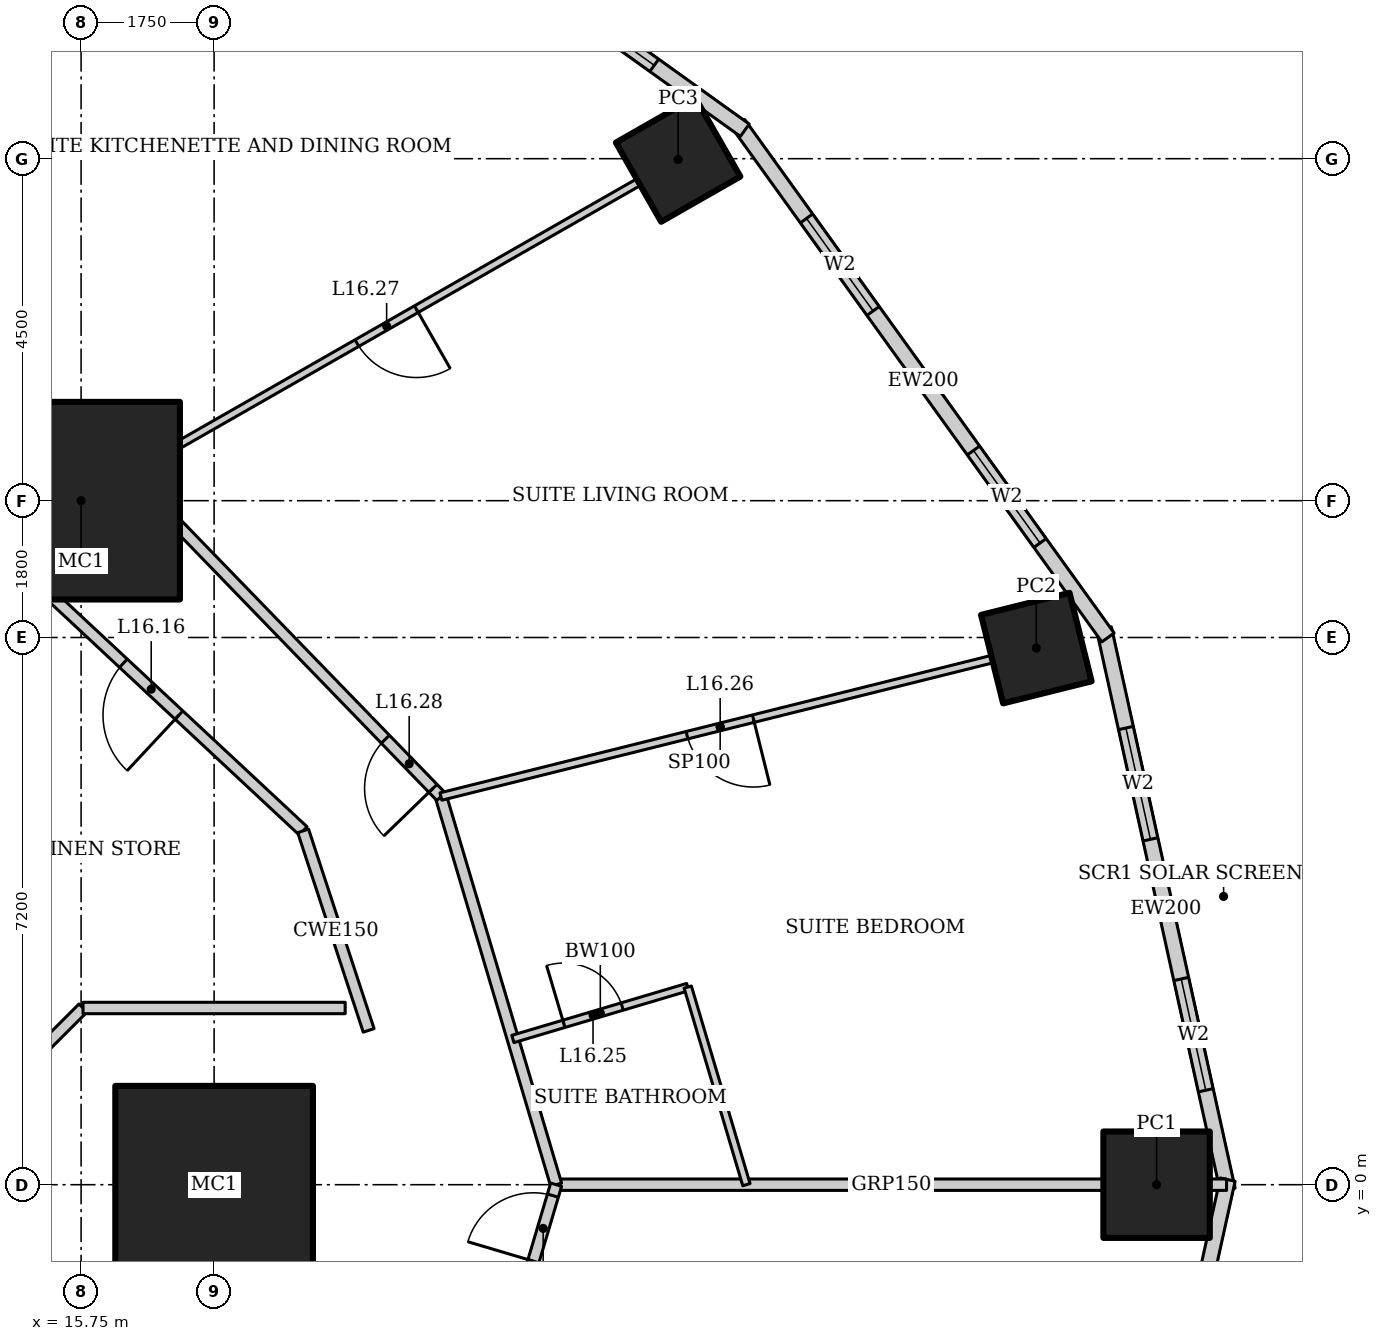
"""IFC4 building model, lengths in metres.
Left out: names, types, materials, properties, quantities, classifications, styles, units other than length and angle.
Written with IfcOpenShell. Run it as: python <this file> out.ifc"""

import sys

from ifc_helpers import new_model, si_unit, direction, frame, frame_2d, origin, origin_2d, place, context, subcontext, project, spatial, rectangle, hollow_rectangle, extrude, element, fill, save


model = new_model("IFC4")
c1 = context("Model", 3, precision=1e-05, world=origin(), true_north=direction((0.0, 1.0)))
c2 = subcontext(c1, "Body", "Model", "MODEL_VIEW")
j1 = project(units=[si_unit("LENGTHUNIT", "METRE"), si_unit("PLANEANGLEUNIT", "RADIAN")], contexts=[c1])
p1 = place(None, origin())
s1 = spatial("IfcSite", under=j1, at=p1, CompositionType="ELEMENT")
p2 = place(p1, origin())
s2 = spatial("IfcBuilding", under=s1, at=p2, CompositionType="ELEMENT")
p3 = place(p2, frame((0.0, 0.0, 73.0)))
s3 = spatial("IfcBuildingStorey", under=s2, at=p3, CompositionType="ELEMENT", Elevation=73.0)
for number, where, z_axis, x_axis in (
    (1, (17.5, 0.0, 0.0), (0.0, 0.0, 1.0), (1.0, 0.0, 0.0)),
    (2, (15.75, 9.0, 0.0), (0.0, 0.0, 1.0), (1.0, 0.0, 0.0)),
):
    element("IfcColumn", number, at=place(p3, frame(where, z_axis=z_axis, x_axis=x_axis)), inside=s3, PredefinedType="COLUMN", context=c2, shape_type="SweptSolid", body=[
        extrude(hollow_rectangle(XDim=2.6, YDim=2.6, WallThickness=0.13, at=origin_2d()), origin(), (0.0, 0.0, 1.0), 3.6),
    ])
p4 = place(p3, frame((29.9, 0.0, 0.0), z_axis=(0.0, 0.0, 1.0), x_axis=(1.0, 0.0, 0.0)))
e3 = element("IfcColumn", 3, at=p4, inside=s3, PredefinedType="COLUMN", context=c2, shape_type="SweptSolid", body=[
    extrude(hollow_rectangle(XDim=1.4, YDim=1.4, WallThickness=0.1, at=origin_2d()), origin(), (0.0, 0.0, 1.0), 3.6),
])
p5 = place(p3, frame((28.318, 7.06, 0.0), z_axis=(0.0, 0.0, 1.0), x_axis=(0.970295726276, 0.2419218956, 0.0)))
e4 = element("IfcColumn", 4, at=p5, inside=s3, PredefinedType="COLUMN", context=c2, shape_type="SweptSolid", body=[
    extrude(hollow_rectangle(XDim=1.2, YDim=1.2, WallThickness=0.1, at=origin_2d()), origin(), (0.0, 0.0, 1.0), 3.6),
])
p6 = place(p3, frame((23.605, 13.489, 0.0), z_axis=(0.0, 0.0, 1.0), x_axis=(0.86824298017, 0.496139221777, 0.0)))
e5 = element("IfcColumn", 5, at=p6, inside=s3, PredefinedType="COLUMN", context=c2, shape_type="SweptSolid", body=[
    extrude(hollow_rectangle(XDim=1.2, YDim=1.2, WallThickness=0.12, at=origin_2d()), origin(), (0.0, 0.0, 1.0), 3.6),
])
p7 = place(p3, frame((30.835, -0.067, 0.0), z_axis=(0.0, 0.0, 1.0), x_axis=(-0.215238065514, 0.976561608478, 0.0)))
e6 = element("IfcWall", 6, at=p7, inside=s3, PredefinedType="SOLIDWALL", context=c2, shape_type="SweptSolid", body=[
    extrude(rectangle(XDim=7.562, YDim=0.2, at=frame_2d((3.781, 0.0))), origin(), (0.0, 0.0, 1.0), 3.45),
])
p8 = place(p7, frame((1.341, 0.0, 0.5)))
e7 = element("IfcOpeningElement", 7, at=p8, cuts=e6, PredefinedType="OPENING", context=c2, shape_type="SweptSolid", body=[
    extrude(rectangle(XDim=1.5, YDim=2.2, at=frame_2d((0.75, 1.1))), frame((0.0, 0.11, 0.0), z_axis=(0.0, -1.0, 0.0), x_axis=(1.0, 0.0, 0.0)), (0.0, 0.0, 1.0), 0.22),
])
p9 = place(p7, frame((4.722, 0.0, 0.5)))
e8 = element("IfcOpeningElement", 8, at=p9, cuts=e6, PredefinedType="OPENING", context=c2, shape_type="SweptSolid", body=[
    extrude(rectangle(XDim=1.5, YDim=2.2, at=frame_2d((0.75, 1.1))), frame((0.0, 0.11, 0.0), z_axis=(0.0, -1.0, 0.0), x_axis=(1.0, 0.0, 0.0)), (0.0, 0.0, 1.0), 0.22),
])
p10 = place(p3, frame((29.26, 7.2, 0.0), z_axis=(0.0, 0.0, 1.0), x_axis=(-0.583937613703, 0.811798536155, 0.0)))
e9 = element("IfcWall", 9, at=p10, inside=s3, PredefinedType="SOLIDWALL", context=c2, shape_type="SweptSolid", body=[
    extrude(rectangle(XDim=8.323, YDim=0.2, at=frame_2d((4.162, 0.0))), origin(), (0.0, 0.0, 1.0), 3.45),
])
p11 = place(p10, frame((1.531, 0.0, 0.5)))
e10 = element("IfcOpeningElement", 10, at=p11, cuts=e9, PredefinedType="OPENING", context=c2, shape_type="SweptSolid", body=[
    extrude(rectangle(XDim=1.5, YDim=2.2, at=frame_2d((0.75, 1.1))), frame((0.0, 0.11, 0.0), z_axis=(0.0, -1.0, 0.0), x_axis=(1.0, 0.0, 0.0)), (0.0, 0.0, 1.0), 0.22),
])
p12 = place(p10, frame((5.292, 0.0, 0.5)))
e11 = element("IfcOpeningElement", 11, at=p12, cuts=e9, PredefinedType="OPENING", context=c2, shape_type="SweptSolid", body=[
    extrude(rectangle(XDim=1.5, YDim=2.2, at=frame_2d((0.75, 1.1))), frame((0.0, 0.11, 0.0), z_axis=(0.0, -1.0, 0.0), x_axis=(1.0, 0.0, 0.0)), (0.0, 0.0, 1.0), 0.22),
])
p13 = place(p3, frame((24.482, 13.875, 0.0), z_axis=(0.0, 0.0, 1.0), x_axis=(-0.812791321576, 0.582554948112, 0.0)))
e12 = element("IfcWall", 12, at=p13, inside=s3, PredefinedType="SOLIDWALL", context=c2, shape_type="SweptSolid", body=[
    extrude(rectangle(XDim=8.063, YDim=0.2, at=frame_2d((4.032, 0.0))), origin(), (0.0, 0.0, 1.0), 3.45),
])
p14 = place(p13, frame((1.466, 0.0, 0.5)))
e13 = element("IfcOpeningElement", 13, at=p14, cuts=e12, PredefinedType="OPENING", context=c2, shape_type="SweptSolid", body=[
    extrude(rectangle(XDim=1.5, YDim=2.2, at=frame_2d((0.75, 1.1))), frame((0.0, 0.11, 0.0), z_axis=(0.0, -1.0, 0.0), x_axis=(1.0, 0.0, 0.0)), (0.0, 0.0, 1.0), 0.22),
])
p15 = place(p13, frame((5.097, 0.0, 0.5)))
e14 = element("IfcOpeningElement", 14, at=p15, cuts=e12, PredefinedType="OPENING", context=c2, shape_type="SweptSolid", body=[
    extrude(rectangle(XDim=1.5, YDim=2.2, at=frame_2d((0.75, 1.1))), frame((0.0, 0.11, 0.0), z_axis=(0.0, -1.0, 0.0), x_axis=(1.0, 0.0, 0.0)), (0.0, 0.0, 1.0), 0.22),
])
p16 = place(p3, frame((29.208, -7.318, 0.0), z_axis=(0.0, 0.0, 1.0), x_axis=(0.215238065514, 0.976561608478, 0.0)))
e15 = element("IfcWall", 15, at=p16, inside=s3, PredefinedType="SOLIDWALL", context=c2, shape_type="SweptSolid", body=[
    extrude(rectangle(XDim=7.562, YDim=0.2, at=frame_2d((3.781, 0.0))), origin(), (0.0, 0.0, 1.0), 3.45),
])
p17 = place(p16, frame((1.341, 0.0, 0.5)))
e16 = element("IfcOpeningElement", 16, at=p17, cuts=e15, PredefinedType="OPENING", context=c2, shape_type="SweptSolid", body=[
    extrude(rectangle(XDim=1.5, YDim=2.2, at=frame_2d((0.75, 1.1))), frame((0.0, 0.11, 0.0), z_axis=(0.0, -1.0, 0.0), x_axis=(1.0, 0.0, 0.0)), (0.0, 0.0, 1.0), 0.22),
])
p18 = place(p16, frame((4.722, 0.0, 0.5)))
e17 = element("IfcOpeningElement", 17, at=p18, cuts=e15, PredefinedType="OPENING", context=c2, shape_type="SweptSolid", body=[
    extrude(rectangle(XDim=1.5, YDim=2.2, at=frame_2d((0.75, 1.1))), frame((0.0, 0.11, 0.0), z_axis=(0.0, -1.0, 0.0), x_axis=(1.0, 0.0, 0.0)), (0.0, 0.0, 1.0), 0.22),
])
p19 = place(p3, frame((30.821, 0.0, 0.0), z_axis=(0.0, 0.0, 1.0), x_axis=(-1.0, 0.0, 0.0)))
e18 = element("IfcWall", 18, at=p19, inside=s3, PredefinedType="PARTITIONING", context=c2, shape_type="SweptSolid", body=[
    extrude(rectangle(XDim=8.821, YDim=0.15, at=frame_2d((4.41, 0.0))), origin(), (0.0, 0.0, 1.0), 2.528),
])
p20 = place(p3, frame((17.97, 18.542, 0.0), z_axis=(0.0, 0.0, 1.0), x_axis=(-0.698279935955, -0.715824790743, 0.0)))
e19 = element("IfcWall", 19, at=p20, inside=s3, PredefinedType="PARTITIONING", context=c2, shape_type="SweptSolid", body=[
    extrude(rectangle(XDim=9.24, YDim=0.15, at=frame_2d((4.62, 0.0))), origin(), (0.0, 0.0, 1.0), 2.528),
])
p21 = place(p3, frame((22.0, 0.0, 0.0), z_axis=(0.0, 0.0, 1.0), x_axis=(-0.284584469409, 0.95865096869, 0.0)))
e20 = element("IfcWall", 20, at=p21, inside=s3, PredefinedType="PARTITIONING", context=c2, shape_type="SweptSolid", body=[
    extrude(rectangle(XDim=5.327, YDim=0.15, at=frame_2d((2.664, 0.0))), origin(), (0.0, 0.0, 1.0), 3.45),
])
p22 = place(p3, frame((20.484, 5.107, 0.0), z_axis=(0.0, 0.0, 1.0), x_axis=(-0.695871090686, 0.71816671125, 0.0)))
e21 = element("IfcWall", 21, at=p22, inside=s3, PredefinedType="PARTITIONING", context=c2, shape_type="SweptSolid", body=[
    extrude(rectangle(XDim=5.913, YDim=0.15, at=frame_2d((2.957, 0.0))), origin(), (0.0, 0.0, 1.0), 3.45),
])
p23 = place(p22, frame((0.15, 0.0, 0.0)))
e22 = element("IfcOpeningElement", 22, at=p23, cuts=e21, PredefinedType="OPENING", context=c2, shape_type="SweptSolid", body=[
    extrude(rectangle(XDim=0.9, YDim=2.1, at=frame_2d((0.45, 1.05))), frame((0.0, 0.085, 0.0), z_axis=(0.0, -1.0, 0.0), x_axis=(1.0, 0.0, 0.0)), (0.0, 0.0, 1.0), 0.17),
])
p24 = place(p3, frame((16.369, 9.354, 0.0), z_axis=(0.0, 0.0, 1.0), x_axis=(-0.883334368785, 0.468743419071, 0.0)))
e23 = element("IfcWall", 23, at=p24, inside=s3, PredefinedType="PARTITIONING", context=c2, shape_type="SweptSolid", body=[
    extrude(rectangle(XDim=5.491, YDim=0.15, at=frame_2d((2.746, 0.0))), origin(), (0.0, 0.0, 1.0), 3.45),
])
p25 = place(p3, frame((20.484, -5.107, 0.0), z_axis=(0.0, 0.0, 1.0), x_axis=(0.284584469409, 0.95865096869, 0.0)))
e24 = element("IfcWall", 24, at=p25, inside=s3, PredefinedType="PARTITIONING", context=c2, shape_type="SweptSolid", body=[
    extrude(rectangle(XDim=5.327, YDim=0.15, at=frame_2d((2.664, 0.0))), origin(), (0.0, 0.0, 1.0), 3.45),
])
p26 = place(p25, frame((4.278, 0.0, 0.0)))
e25 = element("IfcOpeningElement", 25, at=p26, cuts=e24, PredefinedType="OPENING", context=c2, shape_type="SweptSolid", body=[
    extrude(rectangle(XDim=0.9, YDim=2.1, at=frame_2d((0.45, 1.05))), frame((0.0, 0.085, 0.0), z_axis=(0.0, -1.0, 0.0), x_axis=(1.0, 0.0, 0.0)), (0.0, 0.0, 1.0), 0.17),
])
p27 = place(p3, frame((18.672, 4.655, 0.0), z_axis=(0.0, 0.0, 1.0), x_axis=(-0.731260145007, 0.682098673452, 0.0)))
e26 = element("IfcWall", 26, at=p27, inside=s3, PredefinedType="PARTITIONING", context=c2, shape_type="SweptSolid", body=[
    extrude(rectangle(XDim=5.468, YDim=0.15, at=frame_2d((2.734, 0.0))), origin(), (0.0, 0.0, 1.0), 3.45),
])
p28 = place(p27, frame((2.234, 0.0, 0.0)))
e27 = element("IfcOpeningElement", 27, at=p28, cuts=e26, PredefinedType="OPENING", context=c2, shape_type="SweptSolid", body=[
    extrude(rectangle(XDim=1.0, YDim=2.1, at=frame_2d((0.5, 1.05))), frame((0.0, 0.085, 0.0), z_axis=(0.0, -1.0, 0.0), x_axis=(1.0, 0.0, 0.0)), (0.0, 0.0, 1.0), 0.17),
])
p29 = place(p3, frame((21.431, 1.917, 0.0), z_axis=(0.0, 0.0, 1.0), x_axis=(0.958639927723, 0.284621659356, 0.0)))
e28 = element("IfcWall", 28, at=p29, inside=s3, PredefinedType="PARTITIONING", context=c2, shape_type="SweptSolid", body=[
    extrude(rectangle(XDim=2.4, YDim=0.1, at=frame_2d((1.2, 0.0))), origin(), (0.0, 0.0, 1.0), 3.45),
])
p30 = place(p29, frame((0.7, 0.0, 0.0)))
e29 = element("IfcOpeningElement", 29, at=p30, cuts=e28, PredefinedType="OPENING", context=c2, shape_type="SweptSolid", body=[
    extrude(rectangle(XDim=0.8, YDim=2.1, at=frame_2d((0.4, 1.05))), frame((0.0, 0.06, 0.0), z_axis=(0.0, -1.0, 0.0), x_axis=(1.0, 0.0, 0.0)), (0.0, 0.0, 1.0), 0.12),
])
p31 = place(p3, frame((23.732, 2.6, 0.0), z_axis=(0.0, 0.0, 1.0), x_axis=(0.284514277473, -0.958671803025, 0.0)))
e30 = element("IfcWall", 30, at=p31, inside=s3, PredefinedType="PARTITIONING", context=c2, shape_type="SweptSolid", body=[
    extrude(rectangle(XDim=2.712, YDim=0.1, at=frame_2d((1.356, 0.0))), origin(), (0.0, 0.0, 1.0), 3.45),
])
p32 = place(p3, frame((27.833, 6.939, 0.0), z_axis=(0.0, 0.0, 1.0), x_axis=(-0.970295894358, -0.24192122146, 0.0)))
e31 = element("IfcWall", 31, at=p32, inside=s3, PredefinedType="PARTITIONING", context=c2, shape_type="SweptSolid", body=[
    extrude(rectangle(XDim=7.574, YDim=0.1, at=frame_2d((3.787, 0.0))), origin(), (0.0, 0.0, 1.0), 2.333),
])
p33 = place(p32, frame((3.337, 0.0, 0.0)))
e32 = element("IfcOpeningElement", 32, at=p33, cuts=e31, PredefinedType="OPENING", context=c2, shape_type="SweptSolid", body=[
    extrude(rectangle(XDim=0.9, YDim=2.1, at=frame_2d((0.45, 1.05))), frame((0.0, 0.06, 0.0), z_axis=(0.0, -1.0, 0.0), x_axis=(1.0, 0.0, 0.0)), (0.0, 0.0, 1.0), 0.12),
])
p34 = place(p3, frame((23.171, 13.24, 0.0), z_axis=(0.0, 0.0, 1.0), x_axis=(-0.868243142124, -0.496138938357, 0.0)))
e33 = element("IfcWall", 33, at=p34, inside=s3, PredefinedType="PARTITIONING", context=c2, shape_type="SweptSolid", body=[
    extrude(rectangle(XDim=7.834, YDim=0.1, at=frame_2d((3.917, 0.0))), origin(), (0.0, 0.0, 1.0), 2.693),
])
p35 = place(p34, frame((3.467, 0.0, 0.0)))
e34 = element("IfcOpeningElement", 34, at=p35, cuts=e33, PredefinedType="OPENING", context=c2, shape_type="SweptSolid", body=[
    extrude(rectangle(XDim=0.9, YDim=2.1, at=frame_2d((0.45, 1.05))), frame((0.0, 0.06, 0.0), z_axis=(0.0, -1.0, 0.0), x_axis=(1.0, 0.0, 0.0)), (0.0, 0.0, 1.0), 0.12),
])
p36 = place(p3, frame((19.533, 2.03, 0.0), z_axis=(0.0, 0.0, 1.0), x_axis=(-0.311929965981, 0.950105097515, 0.0)))
e35 = element("IfcWall", 35, at=p36, inside=s3, PredefinedType="PARTITIONING", context=c2, shape_type="SweptSolid", body=[
    extrude(rectangle(XDim=2.763, YDim=0.15, at=frame_2d((1.381, 0.0))), origin(), (0.0, 0.0, 1.0), 3.45),
])
p37 = place(p3, frame((15.175, 1.725, 0.0), z_axis=(0.0, 0.0, 1.0), x_axis=(0.707106781187, 0.707106781187, 0.0)))
e36 = element("IfcWall", 36, at=p37, inside=s3, PredefinedType="PARTITIONING", context=c2, shape_type="SweptSolid", body=[
    extrude(rectangle(XDim=0.849, YDim=0.15, at=frame_2d((0.425, 0.0))), origin(), (0.0, 0.0, 1.0), 3.45),
])
p38 = place(p3, frame((15.775, 2.325, 0.0), z_axis=(0.0, 0.0, 1.0), x_axis=(1.0, 0.0, 0.0)))
e37 = element("IfcWall", 37, at=p38, inside=s3, PredefinedType="PARTITIONING", context=c2, shape_type="SweptSolid", body=[
    extrude(rectangle(XDim=3.449, YDim=0.15, at=frame_2d((1.725, 0.0))), origin(), (0.0, 0.0, 1.0), 3.45),
])
p39 = place(p8, origin())
e38 = element("IfcWindow", 38, at=p39, inside=s3, PartitioningType="SINGLE_PANEL", PredefinedType="WINDOW", context=c2, shape_type="SweptSolid", body=[
    extrude(rectangle(XDim=1.5, YDim=2.2, at=frame_2d((0.75, 1.1))), frame((0.0, 0.03, 0.0), z_axis=(0.0, -1.0, 0.0), x_axis=(1.0, 0.0, 0.0)), (0.0, 0.0, 1.0), 0.06),
])
fill(e7, e38)
p40 = place(p9, origin())
e39 = element("IfcWindow", 39, at=p40, inside=s3, PartitioningType="SINGLE_PANEL", PredefinedType="WINDOW", context=c2, shape_type="SweptSolid", body=[
    extrude(rectangle(XDim=1.5, YDim=2.2, at=frame_2d((0.75, 1.1))), frame((0.0, 0.03, 0.0), z_axis=(0.0, -1.0, 0.0), x_axis=(1.0, 0.0, 0.0)), (0.0, 0.0, 1.0), 0.06),
])
fill(e8, e39)
p41 = place(p11, origin())
e40 = element("IfcWindow", 40, at=p41, inside=s3, PartitioningType="SINGLE_PANEL", PredefinedType="WINDOW", context=c2, shape_type="SweptSolid", body=[
    extrude(rectangle(XDim=1.5, YDim=2.2, at=frame_2d((0.75, 1.1))), frame((0.0, 0.03, 0.0), z_axis=(0.0, -1.0, 0.0), x_axis=(1.0, 0.0, 0.0)), (0.0, 0.0, 1.0), 0.06),
])
fill(e10, e40)
p42 = place(p12, origin())
e41 = element("IfcWindow", 41, at=p42, inside=s3, PartitioningType="SINGLE_PANEL", PredefinedType="WINDOW", context=c2, shape_type="SweptSolid", body=[
    extrude(rectangle(XDim=1.5, YDim=2.2, at=frame_2d((0.75, 1.1))), frame((0.0, 0.03, 0.0), z_axis=(0.0, -1.0, 0.0), x_axis=(1.0, 0.0, 0.0)), (0.0, 0.0, 1.0), 0.06),
])
fill(e11, e41)
p43 = place(p14, origin())
e42 = element("IfcWindow", 42, at=p43, inside=s3, PartitioningType="SINGLE_PANEL", PredefinedType="WINDOW", context=c2, shape_type="SweptSolid", body=[
    extrude(rectangle(XDim=1.5, YDim=2.2, at=frame_2d((0.75, 1.1))), frame((0.0, 0.03, 0.0), z_axis=(0.0, -1.0, 0.0), x_axis=(1.0, 0.0, 0.0)), (0.0, 0.0, 1.0), 0.06),
])
fill(e13, e42)
p44 = place(p28, origin())
e43 = element("IfcDoor", 43, at=p44, inside=s3, OperationType="SINGLE_SWING_LEFT", PredefinedType="DOOR", context=c2, shape_type="SweptSolid", body=[
    extrude(rectangle(XDim=1.0, YDim=2.1, at=frame_2d((0.5, 1.05))), frame((0.0, 0.025, 0.0), z_axis=(0.0, -1.0, 0.0), x_axis=(1.0, 0.0, 0.0)), (0.0, 0.0, 1.0), 0.05),
])
fill(e27, e43)
p45 = place(p30, origin())
e44 = element("IfcDoor", 44, at=p45, inside=s3, OperationType="SINGLE_SWING_LEFT", PredefinedType="DOOR", context=c2, shape_type="SweptSolid", body=[
    extrude(rectangle(XDim=0.8, YDim=2.1, at=frame_2d((0.4, 1.05))), frame((0.0, 0.025, 0.0), z_axis=(0.0, -1.0, 0.0), x_axis=(1.0, 0.0, 0.0)), (0.0, 0.0, 1.0), 0.05),
])
fill(e29, e44)
p46 = place(p33, origin())
e45 = element("IfcDoor", 45, at=p46, inside=s3, OperationType="SINGLE_SWING_LEFT", PredefinedType="DOOR", context=c2, shape_type="SweptSolid", body=[
    extrude(rectangle(XDim=0.9, YDim=2.1, at=frame_2d((0.45, 1.05))), frame((0.0, 0.025, 0.0), z_axis=(0.0, -1.0, 0.0), x_axis=(1.0, 0.0, 0.0)), (0.0, 0.0, 1.0), 0.05),
])
fill(e32, e45)
p47 = place(p35, origin())
e46 = element("IfcDoor", 46, at=p47, inside=s3, OperationType="SINGLE_SWING_LEFT", PredefinedType="DOOR", context=c2, shape_type="SweptSolid", body=[
    extrude(rectangle(XDim=0.9, YDim=2.1, at=frame_2d((0.45, 1.05))), frame((0.0, 0.025, 0.0), z_axis=(0.0, -1.0, 0.0), x_axis=(1.0, 0.0, 0.0)), (0.0, 0.0, 1.0), 0.05),
])
fill(e34, e46)
p48 = place(p23, origin())
e47 = element("IfcDoor", 47, at=p48, inside=s3, OperationType="SINGLE_SWING_LEFT", PredefinedType="DOOR", context=c2, shape_type="SweptSolid", body=[
    extrude(rectangle(XDim=0.9, YDim=2.1, at=frame_2d((0.45, 1.05))), frame((0.0, 0.025, 0.0), z_axis=(0.0, -1.0, 0.0), x_axis=(1.0, 0.0, 0.0)), (0.0, 0.0, 1.0), 0.05),
])
fill(e22, e47)
p49 = place(p26, origin())
e48 = element("IfcDoor", 48, at=p49, inside=s3, OperationType="SINGLE_SWING_LEFT", PredefinedType="DOOR", context=c2, shape_type="SweptSolid", body=[
    extrude(rectangle(XDim=0.9, YDim=2.1, at=frame_2d((0.45, 1.05))), frame((0.0, 0.025, 0.0), z_axis=(0.0, -1.0, 0.0), x_axis=(1.0, 0.0, 0.0)), (0.0, 0.0, 1.0), 0.05),
])
fill(e25, e48)
save(model, sys.argv[1])
